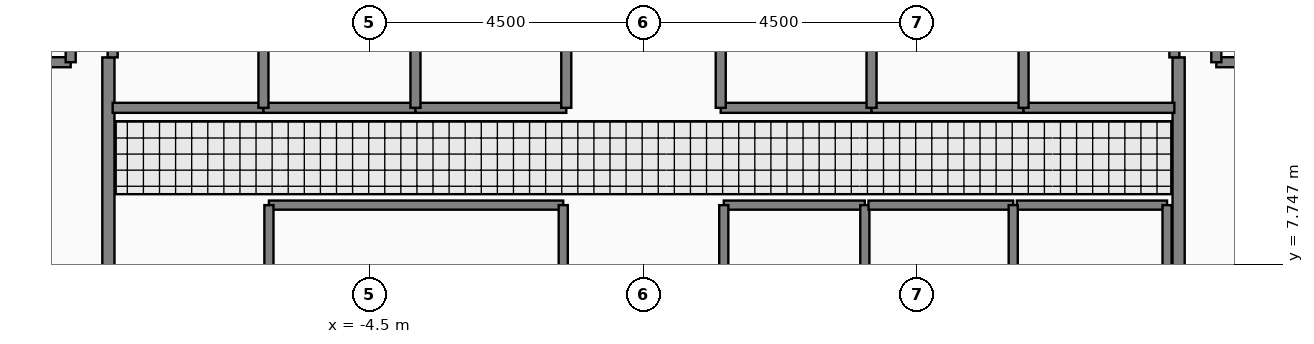
"""IFC4 building model, lengths in metres.
Left out: names, types, materials, properties, quantities, classifications, styles, units other than length and angle.
Written with IfcOpenShell. Run it as: python <this file> out.ifc"""

import sys

from ifc_helpers import new_model, si_unit, direction, frame, frame_2d, origin, place, context, subcontext, project, spatial, rectangle, extrude, element, fill, save


model = new_model("IFC4")
c1 = context("Model", 3, precision=1e-05, world=origin(), true_north=direction((0.0, 1.0)))
c2 = subcontext(c1, "Body", "Model", "MODEL_VIEW")
j1 = project(units=[si_unit("LENGTHUNIT", "METRE"), si_unit("PLANEANGLEUNIT", "RADIAN")], contexts=[c1])
p1 = place(None, origin())
s1 = spatial("IfcSite", under=j1, at=p1, CompositionType="ELEMENT")
p2 = place(p1, origin())
s2 = spatial("IfcBuilding", under=s1, at=p2, CompositionType="ELEMENT")
p3 = place(p2, origin())
s3 = spatial("IfcBuildingStorey", under=s2, at=p3, CompositionType="ELEMENT", Elevation=0.0)
p4 = place(p3, frame((-8.8, 5.05, 0.0), z_axis=(0.0, 0.0, 1.0), x_axis=(0.0, 1.0, 0.0)))
e1 = element("IfcWall", 1, at=p4, inside=s3, PredefinedType="PARTITIONING", context=c2, shape_type="SweptSolid", body=[
    extrude(rectangle(XDim=6.1, YDim=0.2, at=frame_2d((3.05, 0.0))), origin(), (0.0, 0.0, 1.0), 5.75),
])
p5 = place(p4, frame((0.25, 0.0, 0.0)))
e2 = element("IfcOpeningElement", 2, at=p5, cuts=e1, PredefinedType="OPENING", context=c2, shape_type="SweptSolid", body=[
    extrude(rectangle(XDim=1.1, YDim=2.2, at=frame_2d((0.55, 1.1))), frame((0.0, 0.11, 0.0), z_axis=(0.0, -1.0, 0.0), x_axis=(1.0, 0.0, 0.0)), (0.0, 0.0, 1.0), 0.22),
])
p6 = place(p4, frame((3.85, 0.0, 0.0)))
e3 = element("IfcOpeningElement", 3, at=p6, cuts=e1, PredefinedType="OPENING", context=c2, shape_type="SweptSolid", body=[
    extrude(rectangle(XDim=1.1, YDim=2.2, at=frame_2d((0.55, 1.1))), frame((0.0, 0.11, 0.0), z_axis=(0.0, -1.0, 0.0), x_axis=(1.0, 0.0, 0.0)), (0.0, 0.0, 1.0), 0.22),
])
p7 = place(p3, frame((8.8, 11.15, 0.0), z_axis=(0.0, 0.0, 1.0), x_axis=(0.0, -1.0, 0.0)))
e4 = element("IfcWall", 4, at=p7, inside=s3, PredefinedType="PARTITIONING", context=c2, shape_type="SweptSolid", body=[
    extrude(rectangle(XDim=6.1, YDim=0.2, at=frame_2d((3.05, 0.0))), origin(), (0.0, 0.0, 1.0), 5.75),
])
p8 = place(p7, frame((1.15, 0.0, 0.0)))
e5 = element("IfcOpeningElement", 5, at=p8, cuts=e4, PredefinedType="OPENING", context=c2, shape_type="SweptSolid", body=[
    extrude(rectangle(XDim=1.1, YDim=2.2, at=frame_2d((0.55, 1.1))), frame((0.0, 0.11, 0.0), z_axis=(0.0, -1.0, 0.0), x_axis=(1.0, 0.0, 0.0)), (0.0, 0.0, 1.0), 0.22),
])
p9 = place(p7, frame((4.75, 0.0, 0.0)))
e6 = element("IfcOpeningElement", 6, at=p9, cuts=e4, PredefinedType="OPENING", context=c2, shape_type="SweptSolid", body=[
    extrude(rectangle(XDim=1.1, YDim=2.2, at=frame_2d((0.55, 1.1))), frame((0.0, 0.11, 0.0), z_axis=(0.0, -1.0, 0.0), x_axis=(1.0, 0.0, 0.0)), (0.0, 0.0, 1.0), 0.22),
])
p10 = place(p3, frame((-11.58, 11.07, 0.0), z_axis=(0.0, 0.0, 1.0), x_axis=(1.0, 0.0, 0.0)))
e7 = element("IfcWall", 7, at=p10, inside=s3, PredefinedType="PARTITIONING", context=c2, shape_type="SweptSolid", body=[
    extrude(rectangle(XDim=2.16, YDim=0.165, at=frame_2d((1.08, 0.0))), origin(), (0.0, 0.0, 1.0), 5.75),
])
p11 = place(p10, frame((0.53, 0.0, 0.0)))
e8 = element("IfcOpeningElement", 8, at=p11, cuts=e7, PredefinedType="OPENING", context=c2, shape_type="SweptSolid", body=[
    extrude(rectangle(XDim=1.15, YDim=2.25, at=frame_2d((0.575, 1.125))), frame((0.0, 0.093, 0.0), z_axis=(0.0, -1.0, 0.0), x_axis=(1.0, 0.0, 0.0)), (0.0, 0.0, 1.0), 0.185),
])
p12 = place(p3, frame((9.42, 11.07, 0.0), z_axis=(0.0, 0.0, 1.0), x_axis=(1.0, 0.0, 0.0)))
e9 = element("IfcWall", 9, at=p12, inside=s3, PredefinedType="PARTITIONING", context=c2, shape_type="SweptSolid", body=[
    extrude(rectangle(XDim=2.16, YDim=0.165, at=frame_2d((1.08, 0.0))), origin(), (0.0, 0.0, 1.0), 5.75),
])
p13 = place(p12, frame((0.53, 0.0, 0.0)))
e10 = element("IfcOpeningElement", 10, at=p13, cuts=e9, PredefinedType="OPENING", context=c2, shape_type="SweptSolid", body=[
    extrude(rectangle(XDim=1.15, YDim=2.25, at=frame_2d((0.575, 1.125))), frame((0.0, 0.093, 0.0), z_axis=(0.0, -1.0, 0.0), x_axis=(1.0, 0.0, 0.0)), (0.0, 0.0, 1.0), 0.185),
])
p14 = place(p3, frame((-8.73, 10.32, 0.0), z_axis=(0.0, 0.0, 1.0), x_axis=(1.0, 0.0, 0.0)))
e11 = element("IfcWall", 11, at=p14, inside=s3, PredefinedType="PARTITIONING", context=c2, shape_type="SweptSolid", body=[
    extrude(rectangle(XDim=2.48, YDim=0.165, at=frame_2d((1.24, 0.0))), origin(), (0.0, 0.0, 1.0), 5.75),
])
p15 = place(p14, frame((0.69, 0.0, 0.0)))
e12 = element("IfcOpeningElement", 12, at=p15, cuts=e11, PredefinedType="OPENING", context=c2, shape_type="SweptSolid", body=[
    extrude(rectangle(XDim=1.1, YDim=2.25, at=frame_2d((0.55, 1.125))), frame((0.0, 0.093, 0.0), z_axis=(0.0, -1.0, 0.0), x_axis=(1.0, 0.0, 0.0)), (0.0, 0.0, 1.0), 0.185),
])
p16 = place(p3, frame((-6.25, 10.32, 0.0), z_axis=(0.0, 0.0, 1.0), x_axis=(1.0, 0.0, 0.0)))
e13 = element("IfcWall", 13, at=p16, inside=s3, PredefinedType="PARTITIONING", context=c2, shape_type="SweptSolid", body=[
    extrude(rectangle(XDim=2.5, YDim=0.165, at=frame_2d((1.25, 0.0))), origin(), (0.0, 0.0, 1.0), 5.75),
])
p17 = place(p16, frame((0.7, 0.0, 0.0)))
e14 = element("IfcOpeningElement", 14, at=p17, cuts=e13, PredefinedType="OPENING", context=c2, shape_type="SweptSolid", body=[
    extrude(rectangle(XDim=1.1, YDim=2.25, at=frame_2d((0.55, 1.125))), frame((0.0, 0.093, 0.0), z_axis=(0.0, -1.0, 0.0), x_axis=(1.0, 0.0, 0.0)), (0.0, 0.0, 1.0), 0.185),
])
p18 = place(p3, frame((-3.75, 10.32, 0.0), z_axis=(0.0, 0.0, 1.0), x_axis=(1.0, 0.0, 0.0)))
e15 = element("IfcWall", 15, at=p18, inside=s3, PredefinedType="PARTITIONING", context=c2, shape_type="SweptSolid", body=[
    extrude(rectangle(XDim=2.48, YDim=0.165, at=frame_2d((1.24, 0.0))), origin(), (0.0, 0.0, 1.0), 5.75),
])
p19 = place(p18, frame((0.69, 0.0, 0.0)))
e16 = element("IfcOpeningElement", 16, at=p19, cuts=e15, PredefinedType="OPENING", context=c2, shape_type="SweptSolid", body=[
    extrude(rectangle(XDim=1.1, YDim=2.25, at=frame_2d((0.55, 1.125))), frame((0.0, 0.093, 0.0), z_axis=(0.0, -1.0, 0.0), x_axis=(1.0, 0.0, 0.0)), (0.0, 0.0, 1.0), 0.185),
])
p20 = place(p3, frame((1.27, 10.32, 0.0), z_axis=(0.0, 0.0, 1.0), x_axis=(1.0, 0.0, 0.0)))
e17 = element("IfcWall", 17, at=p20, inside=s3, PredefinedType="PARTITIONING", context=c2, shape_type="SweptSolid", body=[
    extrude(rectangle(XDim=2.48, YDim=0.165, at=frame_2d((1.24, 0.0))), origin(), (0.0, 0.0, 1.0), 5.75),
])
p21 = place(p20, frame((0.69, 0.0, 0.0)))
e18 = element("IfcOpeningElement", 18, at=p21, cuts=e17, PredefinedType="OPENING", context=c2, shape_type="SweptSolid", body=[
    extrude(rectangle(XDim=1.1, YDim=2.25, at=frame_2d((0.55, 1.125))), frame((0.0, 0.093, 0.0), z_axis=(0.0, -1.0, 0.0), x_axis=(1.0, 0.0, 0.0)), (0.0, 0.0, 1.0), 0.185),
])
p22 = place(p3, frame((3.75, 10.32, 0.0), z_axis=(0.0, 0.0, 1.0), x_axis=(1.0, 0.0, 0.0)))
e19 = element("IfcWall", 19, at=p22, inside=s3, PredefinedType="PARTITIONING", context=c2, shape_type="SweptSolid", body=[
    extrude(rectangle(XDim=2.5, YDim=0.165, at=frame_2d((1.25, 0.0))), origin(), (0.0, 0.0, 1.0), 5.75),
])
p23 = place(p22, frame((0.7, 0.0, 0.0)))
e20 = element("IfcOpeningElement", 20, at=p23, cuts=e19, PredefinedType="OPENING", context=c2, shape_type="SweptSolid", body=[
    extrude(rectangle(XDim=1.1, YDim=2.25, at=frame_2d((0.55, 1.125))), frame((0.0, 0.093, 0.0), z_axis=(0.0, -1.0, 0.0), x_axis=(1.0, 0.0, 0.0)), (0.0, 0.0, 1.0), 0.185),
])
p24 = place(p3, frame((6.25, 10.32, 0.0), z_axis=(0.0, 0.0, 1.0), x_axis=(1.0, 0.0, 0.0)))
e21 = element("IfcWall", 21, at=p24, inside=s3, PredefinedType="PARTITIONING", context=c2, shape_type="SweptSolid", body=[
    extrude(rectangle(XDim=2.48, YDim=0.165, at=frame_2d((1.24, 0.0))), origin(), (0.0, 0.0, 1.0), 5.75),
])
p25 = place(p24, frame((0.69, 0.0, 0.0)))
e22 = element("IfcOpeningElement", 22, at=p25, cuts=e21, PredefinedType="OPENING", context=c2, shape_type="SweptSolid", body=[
    extrude(rectangle(XDim=1.1, YDim=2.25, at=frame_2d((0.55, 1.125))), frame((0.0, 0.093, 0.0), z_axis=(0.0, -1.0, 0.0), x_axis=(1.0, 0.0, 0.0)), (0.0, 0.0, 1.0), 0.185),
])
p26 = place(p3, frame((1.32, 8.72, 0.0), z_axis=(0.0, 0.0, 1.0), x_axis=(1.0, 0.0, 0.0)))
e23 = element("IfcWall", 23, at=p26, inside=s3, PredefinedType="PARTITIONING", context=c2, shape_type="SweptSolid", body=[
    extrude(rectangle(XDim=2.32, YDim=0.15, at=frame_2d((1.16, 0.0))), origin(), (0.0, 0.0, 1.0), 5.75),
])
p27 = place(p26, frame((0.71, 0.0, 0.0)))
e24 = element("IfcOpeningElement", 24, at=p27, cuts=e23, PredefinedType="OPENING", context=c2, shape_type="SweptSolid", body=[
    extrude(rectangle(XDim=0.9, YDim=2.15, at=frame_2d((0.45, 1.075))), frame((0.0, 0.085, 0.0), z_axis=(0.0, -1.0, 0.0), x_axis=(1.0, 0.0, 0.0)), (0.0, 0.0, 1.0), 0.17),
])
p28 = place(p3, frame((6.14, 8.72, 0.0), z_axis=(0.0, 0.0, 1.0), x_axis=(1.0, 0.0, 0.0)))
e25 = element("IfcWall", 25, at=p28, inside=s3, PredefinedType="PARTITIONING", context=c2, shape_type="SweptSolid", body=[
    extrude(rectangle(XDim=2.47, YDim=0.15, at=frame_2d((1.235, 0.0))), origin(), (0.0, 0.0, 1.0), 5.75),
])
p29 = place(p28, frame((0.785, 0.0, 0.0)))
e26 = element("IfcOpeningElement", 26, at=p29, cuts=e25, PredefinedType="OPENING", context=c2, shape_type="SweptSolid", body=[
    extrude(rectangle(XDim=0.9, YDim=2.15, at=frame_2d((0.45, 1.075))), frame((0.0, 0.085, 0.0), z_axis=(0.0, -1.0, 0.0), x_axis=(1.0, 0.0, 0.0)), (0.0, 0.0, 1.0), 0.17),
])
for number, where, z_axis, x_axis in (
    (27, (-9.42, 11.07, 0.0), (0.0, 0.0, 1.0), (0.0, 1.0, 0.0)),
    (28, (9.42, 11.07, 0.0), (0.0, 0.0, 1.0), (0.0, 1.0, 0.0)),
):
    element("IfcWall", number, at=place(p3, frame(where, z_axis=z_axis, x_axis=x_axis)), inside=s3, PredefinedType="PARTITIONING", context=c2, shape_type="SweptSolid", body=[
        extrude(rectangle(XDim=2.96, YDim=0.165, at=frame_2d((1.48, 0.0))), origin(), (0.0, 0.0, 1.0), 5.75),
    ])
p30 = place(p3, frame((-8.73, 11.15, 0.0), z_axis=(0.0, 0.0, 1.0), x_axis=(0.0, 1.0, 0.0)))
e29 = element("IfcWall", 29, at=p30, inside=s3, PredefinedType="PARTITIONING", context=c2, shape_type="SweptSolid", body=[
    extrude(rectangle(XDim=1.53, YDim=0.165, at=frame_2d((0.765, 0.0))), origin(), (0.0, 0.0, 1.0), 5.75),
])
for number, where, z_axis, x_axis in (
    (30, (-6.25, 10.32, 0.0), (0.0, 0.0, 1.0), (0.0, 1.0, 0.0)),
    (31, (-3.75, 10.32, 0.0), (0.0, 0.0, 1.0), (0.0, 1.0, 0.0)),
    (32, (-1.27, 10.32, 0.0), (0.0, 0.0, 1.0), (0.0, 1.0, 0.0)),
    (33, (1.27, 10.32, 0.0), (0.0, 0.0, 1.0), (0.0, 1.0, 0.0)),
    (34, (3.75, 10.32, 0.0), (0.0, 0.0, 1.0), (0.0, 1.0, 0.0)),
    (35, (6.25, 10.32, 0.0), (0.0, 0.0, 1.0), (0.0, 1.0, 0.0)),
):
    element("IfcWall", number, at=place(p3, frame(where, z_axis=z_axis, x_axis=x_axis)), inside=s3, PredefinedType="PARTITIONING", context=c2, shape_type="SweptSolid", body=[
        extrude(rectangle(XDim=2.36, YDim=0.165, at=frame_2d((1.18, 0.0))), origin(), (0.0, 0.0, 1.0), 5.75),
    ])
p31 = place(p3, frame((8.73, 11.15, 0.0), z_axis=(0.0, 0.0, 1.0), x_axis=(0.0, 1.0, 0.0)))
e36 = element("IfcWall", 36, at=p31, inside=s3, PredefinedType="PARTITIONING", context=c2, shape_type="SweptSolid", body=[
    extrude(rectangle(XDim=1.53, YDim=0.165, at=frame_2d((0.765, 0.0))), origin(), (0.0, 0.0, 1.0), 5.75),
])
p32 = place(p3, frame((-6.16, 8.72, 0.0), z_axis=(0.0, 0.0, 1.0), x_axis=(1.0, 0.0, 0.0)))
e37 = element("IfcWall", 37, at=p32, inside=s3, PredefinedType="PARTITIONING", context=c2, shape_type="SweptSolid", body=[
    extrude(rectangle(XDim=4.84, YDim=0.15, at=frame_2d((2.42, 0.0))), origin(), (0.0, 0.0, 1.0), 5.75),
])
for number, where, z_axis, x_axis in (
    (38, (-6.16, 6.48, 0.0), (0.0, 0.0, 1.0), (0.0, 1.0, 0.0)),
    (39, (-1.32, 6.48, 0.0), (0.0, 0.0, 1.0), (0.0, 1.0, 0.0)),
    (40, (1.32, 6.48, 0.0), (0.0, 0.0, 1.0), (0.0, 1.0, 0.0)),
    (41, (3.64, 6.48, 0.0), (0.0, 0.0, 1.0), (0.0, 1.0, 0.0)),
):
    element("IfcWall", number, at=place(p3, frame(where, z_axis=z_axis, x_axis=x_axis)), inside=s3, PredefinedType="PARTITIONING", context=c2, shape_type="SweptSolid", body=[
        extrude(rectangle(XDim=2.24, YDim=0.15, at=frame_2d((1.12, 0.0))), origin(), (0.0, 0.0, 1.0), 5.75),
    ])
p33 = place(p3, frame((3.7, 8.72, 0.0), z_axis=(0.0, 0.0, 1.0), x_axis=(1.0, 0.0, 0.0)))
e42 = element("IfcWall", 42, at=p33, inside=s3, PredefinedType="PARTITIONING", context=c2, shape_type="SweptSolid", body=[
    extrude(rectangle(XDim=2.38, YDim=0.15, at=frame_2d((1.19, 0.0))), origin(), (0.0, 0.0, 1.0), 5.75),
])
for number, where, z_axis, x_axis in (
    (43, (6.08, 6.48, 0.0), (0.0, 0.0, 1.0), (0.0, 1.0, 0.0)),
    (44, (8.61, 6.48, 0.0), (0.0, 0.0, 1.0), (0.0, 1.0, 0.0)),
):
    element("IfcWall", number, at=place(p3, frame(where, z_axis=z_axis, x_axis=x_axis)), inside=s3, PredefinedType="PARTITIONING", context=c2, shape_type="SweptSolid", body=[
        extrude(rectangle(XDim=2.24, YDim=0.15, at=frame_2d((1.12, 0.0))), origin(), (0.0, 0.0, 1.0), 5.75),
    ])
p34 = place(p6, origin())
e45 = element("IfcDoor", 45, at=p34, inside=s3, OperationType="SINGLE_SWING_LEFT", PredefinedType="DOOR", context=c2, shape_type="SweptSolid", body=[
    extrude(rectangle(XDim=1.1, YDim=2.2, at=frame_2d((0.55, 1.1))), frame((0.0, 0.025, 0.0), z_axis=(0.0, -1.0, 0.0), x_axis=(1.0, 0.0, 0.0)), (0.0, 0.0, 1.0), 0.05),
])
fill(e3, e45)
p35 = place(p8, origin())
e46 = element("IfcDoor", 46, at=p35, inside=s3, OperationType="SINGLE_SWING_RIGHT", PredefinedType="DOOR", context=c2, shape_type="SweptSolid", body=[
    extrude(rectangle(XDim=1.1, YDim=2.2, at=frame_2d((0.55, 1.1))), frame((0.0, 0.025, 0.0), z_axis=(0.0, -1.0, 0.0), x_axis=(1.0, 0.0, 0.0)), (0.0, 0.0, 1.0), 0.05),
])
fill(e5, e46)
p36 = place(p15, origin())
e47 = element("IfcDoor", 47, at=p36, inside=s3, OperationType="SLIDING_TO_LEFT", PredefinedType="DOOR", context=c2, shape_type="SweptSolid", body=[
    extrude(rectangle(XDim=1.1, YDim=2.25, at=frame_2d((0.55, 1.125))), frame((0.0, 0.025, 0.0), z_axis=(0.0, -1.0, 0.0), x_axis=(1.0, 0.0, 0.0)), (0.0, 0.0, 1.0), 0.05),
])
fill(e12, e47)
p37 = place(p17, origin())
e48 = element("IfcDoor", 48, at=p37, inside=s3, OperationType="SLIDING_TO_LEFT", PredefinedType="DOOR", context=c2, shape_type="SweptSolid", body=[
    extrude(rectangle(XDim=1.1, YDim=2.25, at=frame_2d((0.55, 1.125))), frame((0.0, 0.025, 0.0), z_axis=(0.0, -1.0, 0.0), x_axis=(1.0, 0.0, 0.0)), (0.0, 0.0, 1.0), 0.05),
])
fill(e14, e48)
p38 = place(p19, origin())
e49 = element("IfcDoor", 49, at=p38, inside=s3, OperationType="SLIDING_TO_LEFT", PredefinedType="DOOR", context=c2, shape_type="SweptSolid", body=[
    extrude(rectangle(XDim=1.1, YDim=2.25, at=frame_2d((0.55, 1.125))), frame((0.0, 0.025, 0.0), z_axis=(0.0, -1.0, 0.0), x_axis=(1.0, 0.0, 0.0)), (0.0, 0.0, 1.0), 0.05),
])
fill(e16, e49)
p39 = place(p21, origin())
e50 = element("IfcDoor", 50, at=p39, inside=s3, OperationType="SLIDING_TO_LEFT", PredefinedType="DOOR", context=c2, shape_type="SweptSolid", body=[
    extrude(rectangle(XDim=1.1, YDim=2.25, at=frame_2d((0.55, 1.125))), frame((0.0, 0.025, 0.0), z_axis=(0.0, -1.0, 0.0), x_axis=(1.0, 0.0, 0.0)), (0.0, 0.0, 1.0), 0.05),
])
fill(e18, e50)
p40 = place(p23, origin())
e51 = element("IfcDoor", 51, at=p40, inside=s3, OperationType="SLIDING_TO_LEFT", PredefinedType="DOOR", context=c2, shape_type="SweptSolid", body=[
    extrude(rectangle(XDim=1.1, YDim=2.25, at=frame_2d((0.55, 1.125))), frame((0.0, 0.025, 0.0), z_axis=(0.0, -1.0, 0.0), x_axis=(1.0, 0.0, 0.0)), (0.0, 0.0, 1.0), 0.05),
])
fill(e20, e51)
p41 = place(p25, origin())
e52 = element("IfcDoor", 52, at=p41, inside=s3, OperationType="SLIDING_TO_LEFT", PredefinedType="DOOR", context=c2, shape_type="SweptSolid", body=[
    extrude(rectangle(XDim=1.1, YDim=2.25, at=frame_2d((0.55, 1.125))), frame((0.0, 0.025, 0.0), z_axis=(0.0, -1.0, 0.0), x_axis=(1.0, 0.0, 0.0)), (0.0, 0.0, 1.0), 0.05),
])
fill(e22, e52)
p42 = place(p27, origin())
e53 = element("IfcDoor", 53, at=p42, inside=s3, OperationType="SINGLE_SWING_LEFT", PredefinedType="DOOR", context=c2, shape_type="SweptSolid", body=[
    extrude(rectangle(XDim=0.9, YDim=2.15, at=frame_2d((0.45, 1.075))), frame((0.0, 0.025, 0.0), z_axis=(0.0, -1.0, 0.0), x_axis=(1.0, 0.0, 0.0)), (0.0, 0.0, 1.0), 0.05),
])
fill(e24, e53)
p43 = place(p29, origin())
e54 = element("IfcDoor", 54, at=p43, inside=s3, OperationType="SINGLE_SWING_LEFT", PredefinedType="DOOR", context=c2, shape_type="SweptSolid", body=[
    extrude(rectangle(XDim=0.9, YDim=2.15, at=frame_2d((0.45, 1.075))), frame((0.0, 0.025, 0.0), z_axis=(0.0, -1.0, 0.0), x_axis=(1.0, 0.0, 0.0)), (0.0, 0.0, 1.0), 0.05),
])
fill(e26, e54)
save(model, sys.argv[1])
